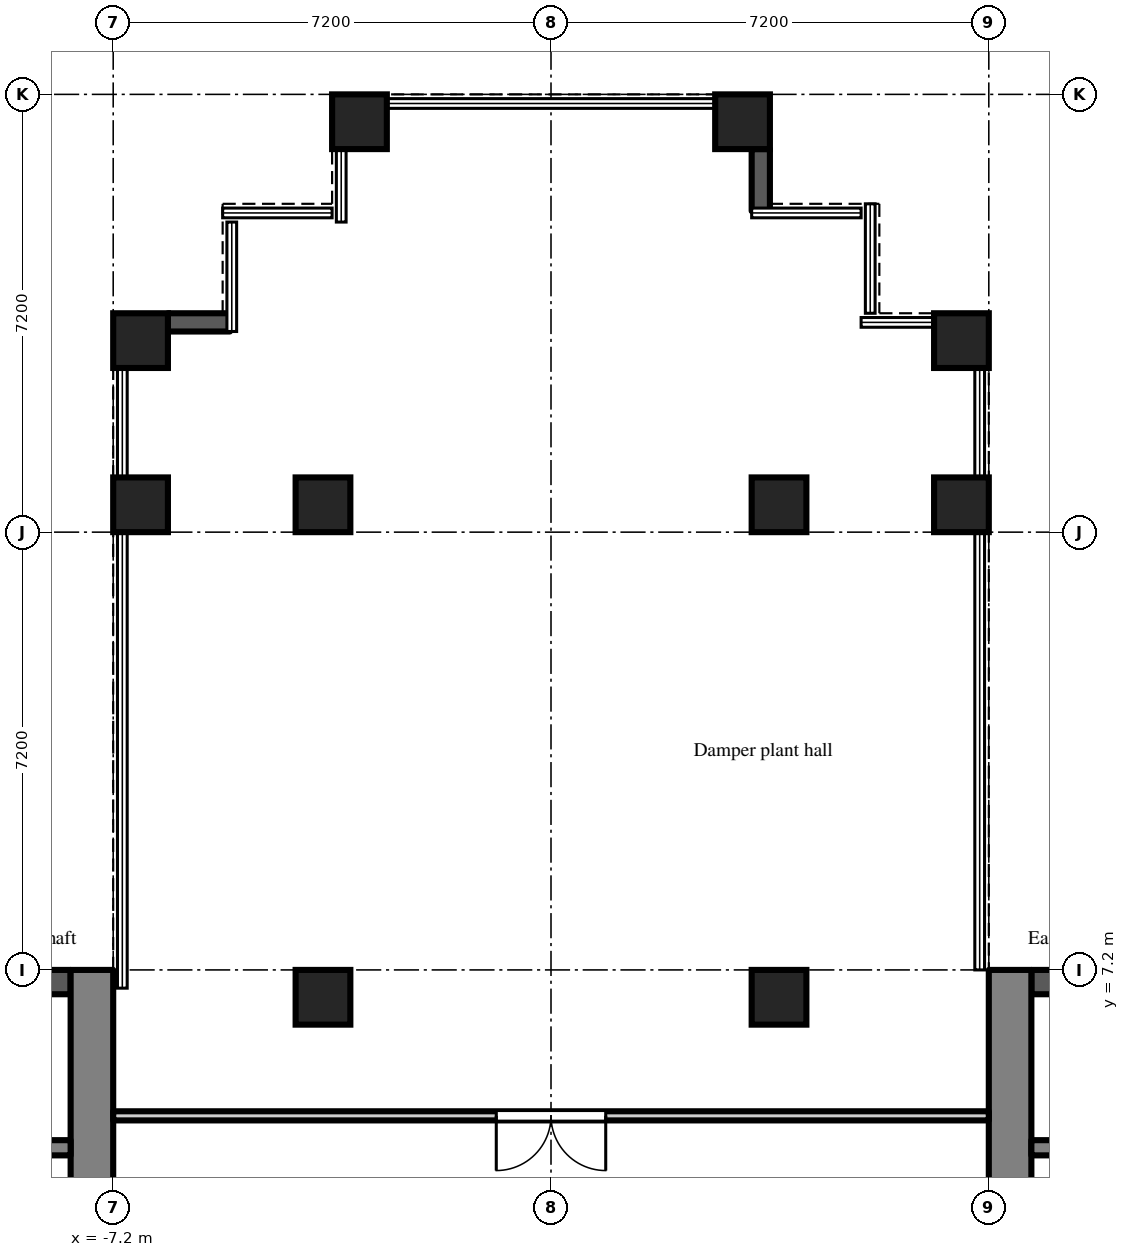
"""IFC4 building model, lengths in metres.
Left out: names, types, materials, properties, quantities, classifications, styles, units other than length and angle.
Written with IfcOpenShell. Run it as: python <this file> out.ifc"""

import sys

from ifc_helpers import new_model, si_unit, direction, frame, frame_2d, origin, origin_2d, place, context, subcontext, project, spatial, rectangle, extrude, element, fill, save


model = new_model("IFC4")
c1 = context("Model", 3, precision=1e-05, world=origin(), true_north=direction((0.0, 1.0)))
c2 = subcontext(c1, "Body", "Model", "MODEL_VIEW")
j1 = project(units=[si_unit("LENGTHUNIT", "METRE"), si_unit("PLANEANGLEUNIT", "RADIAN")], contexts=[c1])
p1 = place(None, origin())
s1 = spatial("IfcSite", under=j1, at=p1, CompositionType="ELEMENT")
p2 = place(p1, origin())
s2 = spatial("IfcBuilding", under=s1, at=p2, CompositionType="ELEMENT")
p3 = place(p2, frame((0.0, 0.0, 242.1)))
s3 = spatial("IfcBuildingStorey", under=s2, at=p3, CompositionType="ELEMENT", Elevation=242.1)
for number, where, z_axis, x_axis in (
    (1, (-6.75, 14.85, 0.0), (0.0, 0.0, 1.0), (1.0, 0.0, 0.0)),
    (2, (-6.75, 17.55, 0.0), (0.0, 0.0, 1.0), (1.0, 0.0, 0.0)),
    (3, (-3.75, 6.75, 0.0), (0.0, 0.0, 1.0), (1.0, 0.0, 0.0)),
    (4, (-3.75, 14.85, 0.0), (0.0, 0.0, 1.0), (1.0, 0.0, 0.0)),
    (5, (-3.15, 21.15, 0.0), (0.0, 0.0, 1.0), (1.0, 0.0, 0.0)),
    (6, (3.15, 21.15, 0.0), (0.0, 0.0, 1.0), (1.0, 0.0, 0.0)),
    (7, (3.75, 6.75, 0.0), (0.0, 0.0, 1.0), (1.0, 0.0, 0.0)),
    (8, (3.75, 14.85, 0.0), (0.0, 0.0, 1.0), (1.0, 0.0, 0.0)),
    (9, (6.75, 14.85, 0.0), (0.0, 0.0, 1.0), (1.0, 0.0, 0.0)),
    (10, (6.75, 17.55, 0.0), (0.0, 0.0, 1.0), (1.0, 0.0, 0.0)),
):
    element("IfcColumn", number, at=place(p3, frame(where, z_axis=z_axis, x_axis=x_axis)), inside=s3, PredefinedType="COLUMN", context=c2, shape_type="SweptSolid", body=[
        extrude(rectangle(XDim=0.9, YDim=0.9, at=origin_2d()), origin(), (0.0, 0.0, 1.0), 5.4),
    ])
for number, where, z_axis, x_axis in (
    (11, (3.45, 19.68, 0.0), (0.0, 0.0, 1.0), (0.0, 1.0, 0.0)),
    (12, (-5.28, 17.85, 0.0), (0.0, 0.0, 1.0), (-1.0, 0.0, 0.0)),
):
    element("IfcWall", number, at=place(p3, frame(where, z_axis=z_axis, x_axis=x_axis)), inside=s3, PredefinedType="SOLIDWALL", context=c2, shape_type="SweptSolid", body=[
        extrude(rectangle(XDim=1.02, YDim=0.3, at=frame_2d((0.51, 0.0))), origin(), (0.0, 0.0, 1.0), 4.95),
    ])
p4 = place(p3, frame((7.55, -7.2, 0.0), z_axis=(0.0, 0.0, 1.0), x_axis=(0.0, 1.0, 0.0)))
e13 = element("IfcWall", 13, at=p4, inside=s3, PredefinedType="SHEAR", context=c2, shape_type="SweptSolid", body=[
    extrude(rectangle(XDim=14.4, YDim=0.7, at=frame_2d((7.2, 0.0))), origin(), (0.0, 0.0, 1.0), 4.95),
])
p5 = place(p4, frame((6.0, 0.0, 0.0)))
e14 = element("IfcOpeningElement", 14, at=p5, cuts=e13, PredefinedType="OPENING", context=c2, shape_type="SweptSolid", body=[
    extrude(rectangle(XDim=2.4, YDim=2.2, at=frame_2d((1.2, 1.1))), frame((0.0, 0.36, 0.0), z_axis=(0.0, -1.0, 0.0), x_axis=(1.0, 0.0, 0.0)), (0.0, 0.0, 1.0), 0.72),
])
p6 = place(p3, frame((7.9, 7.0, 0.0), z_axis=(0.0, 0.0, 1.0), x_axis=(1.0, 0.0, 0.0)))
e15 = element("IfcWall", 15, at=p6, inside=s3, PredefinedType="SHEAR", context=c2, shape_type="SweptSolid", body=[
    extrude(rectangle(XDim=12.95, YDim=0.4, at=frame_2d((6.475, 0.0))), origin(), (0.0, 0.0, 1.0), 4.95),
])
p7 = place(p3, frame((7.9, 4.275, 0.0), z_axis=(0.0, 0.0, 1.0), x_axis=(1.0, 0.0, 0.0)))
e16 = element("IfcWall", 16, at=p7, inside=s3, PredefinedType="SHEAR", context=c2, shape_type="SweptSolid", body=[
    extrude(rectangle(XDim=1.95, YDim=0.25, at=frame_2d((0.975, 0.0))), origin(), (0.0, 0.0, 1.0), 4.95),
])
p8 = place(p3, frame((-7.55, -7.2, 0.0), z_axis=(0.0, 0.0, 1.0), x_axis=(0.0, 1.0, 0.0)))
e17 = element("IfcWall", 17, at=p8, inside=s3, PredefinedType="SHEAR", context=c2, shape_type="SweptSolid", body=[
    extrude(rectangle(XDim=14.4, YDim=0.7, at=frame_2d((7.2, 0.0))), origin(), (0.0, 0.0, 1.0), 4.95),
])
p9 = place(p8, frame((6.0, 0.0, 0.0)))
e18 = element("IfcOpeningElement", 18, at=p9, cuts=e17, PredefinedType="OPENING", context=c2, shape_type="SweptSolid", body=[
    extrude(rectangle(XDim=2.4, YDim=2.2, at=frame_2d((1.2, 1.1))), frame((0.0, 0.36, 0.0), z_axis=(0.0, -1.0, 0.0), x_axis=(1.0, 0.0, 0.0)), (0.0, 0.0, 1.0), 0.72),
])
p10 = place(p3, frame((-7.9, 7.0, 0.0), z_axis=(0.0, 0.0, 1.0), x_axis=(-1.0, 0.0, 0.0)))
e19 = element("IfcWall", 19, at=p10, inside=s3, PredefinedType="SHEAR", context=c2, shape_type="SweptSolid", body=[
    extrude(rectangle(XDim=12.95, YDim=0.4, at=frame_2d((6.475, 0.0))), origin(), (0.0, 0.0, 1.0), 4.95),
])
p11 = place(p3, frame((-7.9, 4.275, 0.0), z_axis=(0.0, 0.0, 1.0), x_axis=(-1.0, 0.0, 0.0)))
e20 = element("IfcWall", 20, at=p11, inside=s3, PredefinedType="SHEAR", context=c2, shape_type="SweptSolid", body=[
    extrude(rectangle(XDim=1.95, YDim=0.25, at=frame_2d((0.975, 0.0))), origin(), (0.0, 0.0, 1.0), 4.95),
])
p12 = place(p3, frame((-7.2, 4.8, 0.0), z_axis=(0.0, 0.0, 1.0), x_axis=(1.0, 0.0, 0.0)))
e21 = element("IfcWall", 21, at=p12, inside=s3, PredefinedType="PARTITIONING", context=c2, shape_type="SweptSolid", body=[
    extrude(rectangle(XDim=14.4, YDim=0.15, at=frame_2d((7.2, 0.0))), origin(), (0.0, 0.0, 1.0), 4.95),
])
p13 = place(p12, frame((6.3, 0.0, 0.0)))
e22 = element("IfcOpeningElement", 22, at=p13, cuts=e21, PredefinedType="OPENING", context=c2, shape_type="SweptSolid", body=[
    extrude(rectangle(XDim=1.8, YDim=2.1, at=frame_2d((0.9, 1.05))), frame((0.0, 0.085, 0.0), z_axis=(0.0, -1.0, 0.0), x_axis=(1.0, 0.0, 0.0)), (0.0, 0.0, 1.0), 0.17),
])
p14 = place(p13, frame((1.8, 0.0, 0.0), z_axis=(0.0, 0.0, 1.0), x_axis=(-1.0, 0.0, 0.0)))
e23 = element("IfcDoor", 23, at=p14, inside=s3, OperationType="DOUBLE_DOOR_DOUBLE_SWING", PredefinedType="DOOR", context=c2, shape_type="SweptSolid", body=[
    extrude(rectangle(XDim=1.8, YDim=2.1, at=frame_2d((0.9, 1.05))), frame((0.0, 0.025, 0.0), z_axis=(0.0, -1.0, 0.0), x_axis=(1.0, 0.0, 0.0)), (0.0, 0.0, 1.0), 0.05),
])
fill(e22, e23)
save(model, sys.argv[1])
